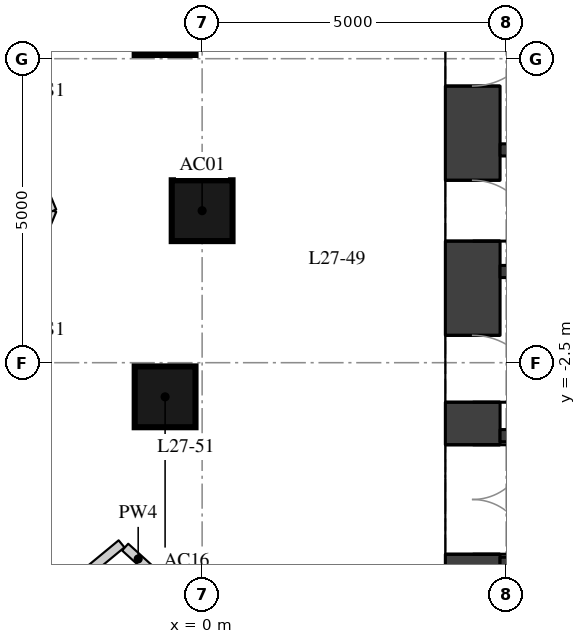
"""IFC4 building model, lengths in metres.
Left out: names, types, materials, properties, quantities, classifications, styles, units other than length and angle.
Written with IfcOpenShell. Run it as: python <this file> out.ifc"""

import sys

from ifc_helpers import new_model, si_unit, direction, frame, frame_2d, origin, origin_2d, place, context, subcontext, project, spatial, rectangle, extrude, element, fill, save


model = new_model("IFC4")
c1 = context("Model", 3, precision=1e-05, world=origin(), true_north=direction((0.0, 1.0)))
c2 = subcontext(c1, "Body", "Model", "MODEL_VIEW")
j1 = project(units=[si_unit("LENGTHUNIT", "METRE"), si_unit("PLANEANGLEUNIT", "RADIAN")], contexts=[c1])
p1 = place(None, origin())
s1 = spatial("IfcSite", under=j1, at=p1, CompositionType="ELEMENT")
p2 = place(p1, origin())
s2 = spatial("IfcBuilding", under=s1, at=p2, CompositionType="ELEMENT")
p3 = place(p2, frame((0.0, 0.0, 98.8)))
s3 = spatial("IfcBuildingStorey", under=s2, at=p3, CompositionType="ELEMENT", Elevation=98.8)
for number, where, z_axis, x_axis in (
    (1, (0.0, 0.0, 0.0), (0.0, 0.0, 1.0), (1.0, 0.0, 0.0)),
    (2, (-0.609, 3.062, 0.0), (0.0, 0.0, 1.0), (1.0, 0.0, 0.0)),
    (3, (-0.609, -3.062, 0.0), (0.0, 0.0, 1.0), (1.0, 0.0, 0.0)),
):
    element("IfcColumn", number, at=place(p3, frame(where, z_axis=z_axis, x_axis=x_axis)), inside=s3, PredefinedType="COLUMN", context=c2, shape_type="SweptSolid", body=[
        extrude(rectangle(XDim=1.0, YDim=1.0, at=origin_2d()), origin(), (0.0, 0.0, 1.0), 3.3),
    ])
p4 = place(p3, frame((4.45, -11.1, 0.0), z_axis=(0.0, 0.0, 1.0), x_axis=(0.0, 1.0, 0.0)))
e4 = element("IfcWall", 4, at=p4, inside=s3, PredefinedType="SHEAR", context=c2, shape_type="SweptSolid", body=[
    extrude(rectangle(XDim=22.2, YDim=0.9, at=frame_2d((11.1, 0.0))), origin(), (0.0, 0.0, 1.0), 3.02),
])
p5 = place(p4, frame((2.35, 0.0, 0.0)))
e5 = element("IfcOpeningElement", 5, at=p5, cuts=e4, PredefinedType="OPENING", context=c2, shape_type="SweptSolid", body=[
    extrude(rectangle(XDim=1.5, YDim=2.1, at=frame_2d((0.75, 1.05))), frame((0.0, 0.46, 0.0), z_axis=(0.0, -1.0, 0.0), x_axis=(1.0, 0.0, 0.0)), (0.0, 0.0, 1.0), 0.92),
])
p6 = place(p4, frame((5.45, 0.0, 0.0)))
e6 = element("IfcOpeningElement", 6, at=p6, cuts=e4, PredefinedType="OPENING", context=c2, shape_type="SweptSolid", body=[
    extrude(rectangle(XDim=1.8, YDim=2.1, at=frame_2d((0.9, 1.05))), frame((0.0, 0.46, 0.0), z_axis=(0.0, -1.0, 0.0), x_axis=(1.0, 0.0, 0.0)), (0.0, 0.0, 1.0), 0.92),
])
p7 = place(p4, frame((7.95, 0.0, 0.0)))
e7 = element("IfcOpeningElement", 7, at=p7, cuts=e4, PredefinedType="OPENING", context=c2, shape_type="SweptSolid", body=[
    extrude(rectangle(XDim=1.1, YDim=2.1, at=frame_2d((0.55, 1.05))), frame((0.0, 0.46, 0.0), z_axis=(0.0, -1.0, 0.0), x_axis=(1.0, 0.0, 0.0)), (0.0, 0.0, 1.0), 0.92),
])
p8 = place(p4, frame((10.6, 0.0, 0.0)))
e8 = element("IfcOpeningElement", 8, at=p8, cuts=e4, PredefinedType="OPENING", context=c2, shape_type="SweptSolid", body=[
    extrude(rectangle(XDim=1.0, YDim=2.1, at=frame_2d((0.5, 1.05))), frame((0.0, 0.46, 0.0), z_axis=(0.0, -1.0, 0.0), x_axis=(1.0, 0.0, 0.0)), (0.0, 0.0, 1.0), 0.92),
])
p9 = place(p4, frame((13.15, 0.0, 0.0)))
e9 = element("IfcOpeningElement", 9, at=p9, cuts=e4, PredefinedType="OPENING", context=c2, shape_type="SweptSolid", body=[
    extrude(rectangle(XDim=1.1, YDim=2.1, at=frame_2d((0.55, 1.05))), frame((0.0, 0.46, 0.0), z_axis=(0.0, -1.0, 0.0), x_axis=(1.0, 0.0, 0.0)), (0.0, 0.0, 1.0), 0.92),
])
p10 = place(p4, frame((14.95, 0.0, 0.0)))
e10 = element("IfcOpeningElement", 10, at=p10, cuts=e4, PredefinedType="OPENING", context=c2, shape_type="SweptSolid", body=[
    extrude(rectangle(XDim=1.8, YDim=2.1, at=frame_2d((0.9, 1.05))), frame((0.0, 0.46, 0.0), z_axis=(0.0, -1.0, 0.0), x_axis=(1.0, 0.0, 0.0)), (0.0, 0.0, 1.0), 0.92),
])
p11 = place(p4, frame((18.35, 0.0, 0.0)))
e11 = element("IfcOpeningElement", 11, at=p11, cuts=e4, PredefinedType="OPENING", context=c2, shape_type="SweptSolid", body=[
    extrude(rectangle(XDim=1.5, YDim=2.1, at=frame_2d((0.75, 1.05))), frame((0.0, 0.46, 0.0), z_axis=(0.0, -1.0, 0.0), x_axis=(1.0, 0.0, 0.0)), (0.0, 0.0, 1.0), 0.92),
])
for number, where, z_axis, x_axis in (
    (12, (4.9, 1.0, 0.0), (0.0, 0.0, 1.0), (1.0, 0.0, 0.0)),
    (13, (4.9, -1.0, 0.0), (0.0, 0.0, 1.0), (1.0, 0.0, 0.0)),
):
    element("IfcWall", number, at=place(p3, frame(where, z_axis=z_axis, x_axis=x_axis)), inside=s3, PredefinedType="SHEAR", context=c2, shape_type="SweptSolid", body=[
        extrude(rectangle(XDim=10.2, YDim=0.2, at=frame_2d((5.1, 0.0))), origin(), (0.0, 0.0, 1.0), 3.02),
    ])
p12 = place(p3, frame((4.9, -3.7, 0.0), z_axis=(0.0, 0.0, 1.0), x_axis=(1.0, 0.0, 0.0)))
e14 = element("IfcWall", 14, at=p12, inside=s3, PredefinedType="SHEAR", context=c2, shape_type="SweptSolid", body=[
    extrude(rectangle(XDim=10.2, YDim=0.2, at=frame_2d((5.1, 0.0))), origin(), (0.0, 0.0, 1.0), 3.02),
])
p13 = place(p12, frame((6.3, 0.0, 0.0)))
e15 = element("IfcOpeningElement", 15, at=p13, cuts=e14, PredefinedType="OPENING", context=c2, shape_type="SweptSolid", body=[
    extrude(rectangle(XDim=1.1, YDim=2.1, at=frame_2d((0.55, 1.05))), frame((0.0, 0.11, 0.0), z_axis=(0.0, -1.0, 0.0), x_axis=(1.0, 0.0, 0.0)), (0.0, 0.0, 1.0), 0.22),
])
p14 = place(p12, frame((8.6, 0.0, 0.0)))
e16 = element("IfcOpeningElement", 16, at=p14, cuts=e14, PredefinedType="OPENING", context=c2, shape_type="SweptSolid", body=[
    extrude(rectangle(XDim=1.1, YDim=2.1, at=frame_2d((0.55, 1.05))), frame((0.0, 0.11, 0.0), z_axis=(0.0, -1.0, 0.0), x_axis=(1.0, 0.0, 0.0)), (0.0, 0.0, 1.0), 0.22),
])
p15 = place(p3, frame((4.9, -5.8, 0.0), z_axis=(0.0, 0.0, 1.0), x_axis=(1.0, 0.0, 0.0)))
e17 = element("IfcWall", 17, at=p15, inside=s3, PredefinedType="SHEAR", context=c2, shape_type="SweptSolid", body=[
    extrude(rectangle(XDim=10.2, YDim=0.2, at=frame_2d((5.1, 0.0))), origin(), (0.0, 0.0, 1.0), 3.02),
])
p16 = place(p3, frame((-3.704, -7.442, 0.0), z_axis=(0.0, 0.0, 1.0), x_axis=(0.771379108851, 0.636375887686, 0.0)))
e18 = element("IfcWall", 18, at=p16, inside=s3, PredefinedType="PARTITIONING", context=c2, shape_type="SweptSolid", body=[
    extrude(rectangle(XDim=3.083, YDim=0.15, at=frame_2d((1.542, 0.0))), origin(), (0.0, 0.0, 1.0), 3.02),
])
p17 = place(p16, frame((1.092, 0.0, 0.0)))
e19 = element("IfcOpeningElement", 19, at=p17, cuts=e18, PredefinedType="OPENING", context=c2, shape_type="SweptSolid", body=[
    extrude(rectangle(XDim=0.9, YDim=2.1, at=frame_2d((0.45, 1.05))), frame((0.0, 0.085, 0.0), z_axis=(0.0, -1.0, 0.0), x_axis=(1.0, 0.0, 0.0)), (0.0, 0.0, 1.0), 0.17),
])
p18 = place(p3, frame((-1.266, -5.533, 0.0), z_axis=(0.0, 0.0, 1.0), x_axis=(0.740704364941, -0.671831112525, 0.0)))
e20 = element("IfcWall", 20, at=p18, inside=s3, PredefinedType="PARTITIONING", context=c2, shape_type="SweptSolid", body=[
    extrude(rectangle(XDim=0.578, YDim=0.15, at=frame_2d((0.289, 0.0))), origin(), (0.0, 0.0, 1.0), 3.02),
])
for number, where, z_axis, x_axis in (
    (21, (-2.446, 0.0, 0.0), (0.0, 0.0, 1.0), (-0.383, -0.924, 0.0)),
    (22, (-4.073, 3.927, 0.0), (0.0, 0.0, 1.0), (0.383, -0.924, 0.0)),
):
    element("IfcWall", number, at=place(p3, frame(where, z_axis=z_axis, x_axis=x_axis)), inside=s3, PredefinedType="PARTITIONING", context=c2, shape_type="SweptSolid", body=[
        extrude(rectangle(XDim=4.251, YDim=0.1, at=frame_2d((2.125, 0.0))), origin(), (0.0, 0.0, 1.0), 3.02),
    ])
p19 = place(p6, origin())
e23 = element("IfcDoor", 23, at=p19, inside=s3, OperationType="DOUBLE_DOOR_SINGLE_SWING", PredefinedType="DOOR", context=c2, shape_type="SweptSolid", body=[
    extrude(rectangle(XDim=1.8, YDim=2.1, at=frame_2d((0.9, 1.05))), frame((0.0, 0.025, 0.0), z_axis=(0.0, -1.0, 0.0), x_axis=(1.0, 0.0, 0.0)), (0.0, 0.0, 1.0), 0.05),
])
fill(e6, e23)
p20 = place(p7, origin())
e24 = element("IfcDoor", 24, at=p20, inside=s3, OperationType="SINGLE_SWING_RIGHT", PredefinedType="DOOR", context=c2, shape_type="SweptSolid", body=[
    extrude(rectangle(XDim=1.1, YDim=2.1, at=frame_2d((0.55, 1.05))), frame((0.0, 0.025, 0.0), z_axis=(0.0, -1.0, 0.0), x_axis=(1.0, 0.0, 0.0)), (0.0, 0.0, 1.0), 0.05),
])
fill(e7, e24)
p21 = place(p8, origin())
e25 = element("IfcDoor", 25, at=p21, inside=s3, OperationType="SINGLE_SWING_RIGHT", PredefinedType="DOOR", context=c2, shape_type="SweptSolid", body=[
    extrude(rectangle(XDim=1.0, YDim=2.1, at=frame_2d((0.5, 1.05))), frame((0.0, 0.025, 0.0), z_axis=(0.0, -1.0, 0.0), x_axis=(1.0, 0.0, 0.0)), (0.0, 0.0, 1.0), 0.05),
])
fill(e8, e25)
p22 = place(p9, origin())
e26 = element("IfcDoor", 26, at=p22, inside=s3, OperationType="SINGLE_SWING_LEFT", PredefinedType="DOOR", context=c2, shape_type="SweptSolid", body=[
    extrude(rectangle(XDim=1.1, YDim=2.1, at=frame_2d((0.55, 1.05))), frame((0.0, 0.025, 0.0), z_axis=(0.0, -1.0, 0.0), x_axis=(1.0, 0.0, 0.0)), (0.0, 0.0, 1.0), 0.05),
])
fill(e9, e26)
save(model, sys.argv[1])
